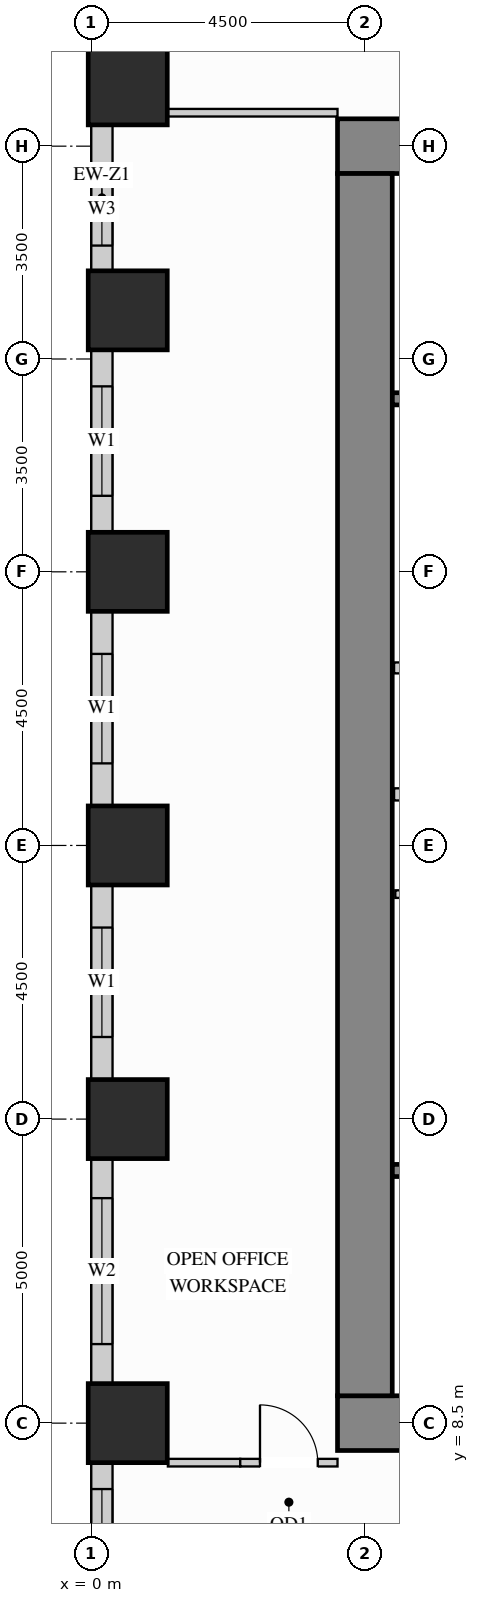
"""IFC4 building model, lengths in metres.
Left out: names, types, materials, properties, quantities, classifications, styles, units other than length and angle.
Written with IfcOpenShell. Run it as: python <this file> out.ifc"""

import sys

from ifc_helpers import new_model, si_unit, direction, frame, frame_2d, origin, origin_2d, place, context, subcontext, project, spatial, rectangle, extrude, source, transform, mapped, element, fill, save


model = new_model("IFC4")
c1 = context("Model", 3, precision=1e-05, world=origin(), true_north=direction((0.0, 1.0)))
c2 = subcontext(c1, "Body", "Model", "MODEL_VIEW")
j1 = project(units=[si_unit("LENGTHUNIT", "METRE"), si_unit("PLANEANGLEUNIT", "RADIAN")], contexts=[c1])
p1 = place(None, origin())
s1 = spatial("IfcSite", under=j1, at=p1, CompositionType="ELEMENT")
p2 = place(p1, origin())
s2 = spatial("IfcBuilding", under=s1, at=p2, CompositionType="ELEMENT")
p3 = place(p2, frame((0.0, 0.0, 44.1)))
s3 = spatial("IfcBuildingStorey", under=s2, at=p3, CompositionType="ELEMENT", Elevation=44.1)
m1 = source(origin(), c2, "Body", "SweptSolid", [
    extrude(rectangle(XDim=1.3, YDim=1.3, at=origin_2d()), origin(), (0.0, 0.0, 1.0), 3.38),
])
for number, where, z_axis, x_axis in (
    (1, (0.6, 13.5, 0.0), (0.0, 0.0, 1.0), (1.0, 0.0, 0.0)),
    (2, (0.6, 18.0, 0.0), (0.0, 0.0, 1.0), (1.0, 0.0, 0.0)),
    (3, (0.6, 22.5, 0.0), (0.0, 0.0, 1.0), (1.0, 0.0, 0.0)),
    (4, (0.6, 26.8, 0.0), (0.0, 0.0, 1.0), (1.0, 0.0, 0.0)),
    (5, (0.6, 30.5, 0.0), (0.0, 0.0, 1.0), (1.0, 0.0, 0.0)),
    (6, (0.6, 8.5, 0.0), (0.0, 0.0, 1.0), (1.0, 0.0, 0.0)),
):
    element("IfcColumn", number, at=place(p3, frame(where, z_axis=z_axis, x_axis=x_axis)), inside=s3, PredefinedType="COLUMN", context=c2, shape_type="MappedRepresentation", body=[
        mapped(m1, transform((0.0, 0.0, 0.0), x_axis=(1.0, 0.0, 0.0), y_axis=(0.0, 1.0, 0.0), z_axis=(0.0, 0.0, 1.0))),
    ])
m2 = source(origin(), c2, "Body", "SweptSolid", [
    extrude(rectangle(XDim=10.9, YDim=0.9, at=frame_2d((5.45, 0.0))), origin(), (0.0, 0.0, 1.0), 3.38),
])
for number, where, z_axis, x_axis in (
    (7, (4.05, 29.5, 0.0), (0.0, 0.0, 1.0), (1.0, 0.0, 0.0)),
    (8, (4.05, 8.5, 0.0), (0.0, 0.0, 1.0), (1.0, 0.0, 0.0)),
):
    element("IfcWall", number, at=place(p3, frame(where, z_axis=z_axis, x_axis=x_axis)), inside=s3, PredefinedType="SHEAR", context=c2, shape_type="MappedRepresentation", body=[
        mapped(m2, transform((0.0, 0.0, 0.0), x_axis=(1.0, 0.0, 0.0), y_axis=(0.0, 1.0, 0.0), z_axis=(0.0, 0.0, 1.0))),
    ])
m3 = source(origin(), c2, "Body", "SweptSolid", [
    extrude(rectangle(XDim=20.1, YDim=0.9, at=frame_2d((10.05, 0.0))), origin(), (0.0, 0.0, 1.0), 3.38),
])
p4 = place(p3, frame((4.5, 8.95, 0.0), z_axis=(0.0, 0.0, 1.0), x_axis=(0.0, 1.0, 0.0)))
e9 = element("IfcWall", 9, at=p4, inside=s3, PredefinedType="SHEAR", context=c2, shape_type="MappedRepresentation", body=[
    mapped(m3, transform((0.0, 0.0, 0.0), x_axis=(1.0, 0.0, 0.0), y_axis=(0.0, 1.0, 0.0), z_axis=(0.0, 0.0, 1.0))),
])
p5 = place(p3, frame((0.175, 29.852, 0.0), z_axis=(0.0, 0.0, 1.0), x_axis=(0.0, -1.0, 0.0)))
e10 = element("IfcWall", 10, at=p5, inside=s3, PredefinedType="SOLIDWALL", context=c2, shape_type="SweptSolid", body=[
    extrude(rectangle(XDim=2.404, YDim=0.35, at=frame_2d((1.202, 0.0))), origin(), (0.0, 0.0, 1.0), 2.51),
])
p6 = place(p5, frame((0.787, 0.0, 0.78)))
e11 = element("IfcOpeningElement", 11, at=p6, cuts=e10, PredefinedType="OPENING", context=c2, shape_type="SweptSolid", body=[
    extrude(rectangle(XDim=1.2, YDim=1.55, at=frame_2d((0.6, 0.775))), frame((0.0, 0.185, 0.0), z_axis=(0.0, -1.0, 0.0), x_axis=(1.0, 0.0, 0.0)), (0.0, 0.0, 1.0), 0.37),
])
p7 = place(p3, frame((0.175, 26.152, 0.0), z_axis=(0.0, 0.0, 1.0), x_axis=(0.0, -1.0, 0.0)))
e12 = element("IfcWall", 12, at=p7, inside=s3, PredefinedType="SOLIDWALL", context=c2, shape_type="SweptSolid", body=[
    extrude(rectangle(XDim=3.004, YDim=0.35, at=frame_2d((1.502, 0.0))), origin(), (0.0, 0.0, 1.0), 2.51),
])
p8 = place(p7, frame((0.602, 0.0, 0.78)))
e13 = element("IfcOpeningElement", 13, at=p8, cuts=e12, PredefinedType="OPENING", context=c2, shape_type="SweptSolid", body=[
    extrude(rectangle(XDim=1.8, YDim=1.55, at=frame_2d((0.9, 0.775))), frame((0.0, 0.185, 0.0), z_axis=(0.0, -1.0, 0.0), x_axis=(1.0, 0.0, 0.0)), (0.0, 0.0, 1.0), 0.37),
])
p9 = place(p3, frame((0.175, 21.852, 0.0), z_axis=(0.0, 0.0, 1.0), x_axis=(0.0, -1.0, 0.0)))
e14 = element("IfcWall", 14, at=p9, inside=s3, PredefinedType="SOLIDWALL", context=c2, shape_type="SweptSolid", body=[
    extrude(rectangle(XDim=3.204, YDim=0.35, at=frame_2d((1.602, 0.0))), origin(), (0.0, 0.0, 1.0), 2.51),
])
p10 = place(p9, frame((0.702, 0.0, 0.78)))
e15 = element("IfcOpeningElement", 15, at=p10, cuts=e14, PredefinedType="OPENING", context=c2, shape_type="SweptSolid", body=[
    extrude(rectangle(XDim=1.8, YDim=1.55, at=frame_2d((0.9, 0.775))), frame((0.0, 0.185, 0.0), z_axis=(0.0, -1.0, 0.0), x_axis=(1.0, 0.0, 0.0)), (0.0, 0.0, 1.0), 0.37),
])
p11 = place(p3, frame((0.175, 17.352, 0.0), z_axis=(0.0, 0.0, 1.0), x_axis=(0.0, -1.0, 0.0)))
e16 = element("IfcWall", 16, at=p11, inside=s3, PredefinedType="SOLIDWALL", context=c2, shape_type="SweptSolid", body=[
    extrude(rectangle(XDim=3.204, YDim=0.35, at=frame_2d((1.602, 0.0))), origin(), (0.0, 0.0, 1.0), 2.51),
])
p12 = place(p11, frame((0.702, 0.0, 0.78)))
e17 = element("IfcOpeningElement", 17, at=p12, cuts=e16, PredefinedType="OPENING", context=c2, shape_type="SweptSolid", body=[
    extrude(rectangle(XDim=1.8, YDim=1.55, at=frame_2d((0.9, 0.775))), frame((0.0, 0.185, 0.0), z_axis=(0.0, -1.0, 0.0), x_axis=(1.0, 0.0, 0.0)), (0.0, 0.0, 1.0), 0.37),
])
p13 = place(p3, frame((0.175, 12.852, 0.0), z_axis=(0.0, 0.0, 1.0), x_axis=(0.0, -1.0, 0.0)))
e18 = element("IfcWall", 18, at=p13, inside=s3, PredefinedType="SOLIDWALL", context=c2, shape_type="SweptSolid", body=[
    extrude(rectangle(XDim=3.704, YDim=0.35, at=frame_2d((1.852, 0.0))), origin(), (0.0, 0.0, 1.0), 2.51),
])
p14 = place(p13, frame((0.652, 0.0, 0.78)))
e19 = element("IfcOpeningElement", 19, at=p14, cuts=e18, PredefinedType="OPENING", context=c2, shape_type="SweptSolid", body=[
    extrude(rectangle(XDim=2.4, YDim=1.55, at=frame_2d((1.2, 0.775))), frame((0.0, 0.185, 0.0), z_axis=(0.0, -1.0, 0.0), x_axis=(1.0, 0.0, 0.0)), (0.0, 0.0, 1.0), 0.37),
])
p15 = place(p3, frame((0.175, 7.852, 0.0), z_axis=(0.0, 0.0, 1.0), x_axis=(0.0, -1.0, 0.0)))
e20 = element("IfcWall", 20, at=p15, inside=s3, PredefinedType="SOLIDWALL", context=c2, shape_type="SweptSolid", body=[
    extrude(rectangle(XDim=3.704, YDim=0.35, at=frame_2d((1.852, 0.0))), origin(), (0.0, 0.0, 1.0), 2.51),
])
p16 = place(p15, frame((0.436, 0.0, 0.78)))
e21 = element("IfcOpeningElement", 21, at=p16, cuts=e20, PredefinedType="OPENING", context=c2, shape_type="SweptSolid", body=[
    extrude(rectangle(XDim=2.4, YDim=1.55, at=frame_2d((1.2, 0.775))), frame((0.0, 0.185, 0.0), z_axis=(0.0, -1.0, 0.0), x_axis=(1.0, 0.0, 0.0)), (0.0, 0.0, 1.0), 0.37),
])
m4 = source(origin(), c2, "Body", "SweptSolid", [
    extrude(rectangle(XDim=2.17, YDim=0.18, at=frame_2d((1.085, 0.0))), origin(), (0.0, 0.0, 1.0), 3.365),
])
p17 = place(p3, frame((4.98, 20.92, 0.0), z_axis=(0.0, 0.0, 1.0), x_axis=(1.0, 0.0, 0.0)))
e22 = element("IfcWall", 22, at=p17, inside=s3, PredefinedType="PARTITIONING", context=c2, shape_type="MappedRepresentation", body=[
    mapped(m4, transform((0.0, 0.0, 0.0), x_axis=(1.0, 0.0, 0.0), y_axis=(0.0, 1.0, 0.0), z_axis=(0.0, 0.0, 1.0))),
])
p18 = place(p3, frame((5.0, 17.2, 0.0), z_axis=(0.0, 0.0, 1.0), x_axis=(1.0, 0.0, 0.0)))
e23 = element("IfcWall", 23, at=p18, inside=s3, PredefinedType="PARTITIONING", context=c2, shape_type="SweptSolid", body=[
    extrude(rectangle(XDim=2.4, YDim=0.125, at=frame_2d((1.2, 0.0))), origin(), (0.0, 0.0, 1.0), 3.365),
])
p19 = place(p18, frame((0.7, 0.0, 0.0)))
e24 = element("IfcOpeningElement", 24, at=p19, cuts=e23, PredefinedType="OPENING", context=c2, shape_type="SweptSolid", body=[
    extrude(rectangle(XDim=0.85, YDim=2.1, at=frame_2d((0.425, 1.05))), frame((0.0, 0.073, 0.0), z_axis=(0.0, -1.0, 0.0), x_axis=(1.0, 0.0, 0.0)), (0.0, 0.0, 1.0), 0.145),
])
m5 = source(origin(), c2, "Body", "SweptSolid", [
    extrude(rectangle(XDim=2.79, YDim=0.125, at=frame_2d((1.395, 0.0))), origin(), (0.0, 0.0, 1.0), 3.365),
])
p20 = place(p3, frame((1.26, 30.05, 0.0), z_axis=(0.0, 0.0, 1.0), x_axis=(1.0, 0.0, 0.0)))
e25 = element("IfcWall", 25, at=p20, inside=s3, PredefinedType="PARTITIONING", context=c2, shape_type="MappedRepresentation", body=[
    mapped(m5, transform((0.0, 0.0, 0.0), x_axis=(1.0, 0.0, 0.0), y_axis=(0.0, 1.0, 0.0), z_axis=(0.0, 0.0, 1.0))),
])
m6 = source(origin(), c2, "Body", "SweptSolid", [
    extrude(rectangle(XDim=1.19, YDim=0.125, at=frame_2d((0.595, 0.0))), origin(), (0.0, 0.0, 1.0), 3.365),
])
p21 = place(p3, frame((1.26, 7.85, 0.0), z_axis=(0.0, 0.0, 1.0), x_axis=(1.0, 0.0, 0.0)))
e26 = element("IfcWall", 26, at=p21, inside=s3, PredefinedType="PARTITIONING", context=c2, shape_type="MappedRepresentation", body=[
    mapped(m6, transform((0.0, 0.0, 0.0), x_axis=(1.0, 0.0, 0.0), y_axis=(0.0, 1.0, 0.0), z_axis=(0.0, 0.0, 1.0))),
])
p22 = place(p3, frame((2.45, 7.85, 0.0), z_axis=(0.0, 0.0, 1.0), x_axis=(1.0, 0.0, 0.0)))
e27 = element("IfcWall", 27, at=p22, inside=s3, PredefinedType="PARTITIONING", context=c2, shape_type="SweptSolid", body=[
    extrude(rectangle(XDim=1.6, YDim=0.125, at=frame_2d((0.8, 0.0))), origin(), (0.0, 0.0, 1.0), 3.365),
])
p23 = place(p22, frame((0.325, 0.0, 0.0)))
e28 = element("IfcOpeningElement", 28, at=p23, cuts=e27, PredefinedType="OPENING", context=c2, shape_type="SweptSolid", body=[
    extrude(rectangle(XDim=0.95, YDim=2.15, at=frame_2d((0.475, 1.075))), frame((0.0, 0.073, 0.0), z_axis=(0.0, -1.0, 0.0), x_axis=(1.0, 0.0, 0.0)), (0.0, 0.0, 1.0), 0.145),
])
m7 = source(origin(), c2, "Body", "SweptSolid", [
    extrude(rectangle(XDim=2.09, YDim=0.2, at=frame_2d((1.045, 0.0))), origin(), (0.0, 0.0, 1.0), 3.365),
])
p24 = place(p3, frame((4.98, 18.84, 0.0), z_axis=(0.0, 0.0, 1.0), x_axis=(1.0, 0.0, 0.0)))
e29 = element("IfcWall", 29, at=p24, inside=s3, PredefinedType="PARTITIONING", context=c2, shape_type="MappedRepresentation", body=[
    mapped(m7, transform((0.0, 0.0, 0.0), x_axis=(1.0, 0.0, 0.0), y_axis=(0.0, 1.0, 0.0), z_axis=(0.0, 0.0, 1.0))),
])
p25 = place(p3, frame((4.952, 12.655, 0.0), z_axis=(0.0, 0.0, 1.0), x_axis=(1.0, 0.0, 0.0)))
e30 = element("IfcWall", 30, at=p25, inside=s3, PredefinedType="SHEAR", context=c2, shape_type="SweptSolid", body=[
    extrude(rectangle(XDim=7.453, YDim=0.2, at=frame_2d((3.727, 0.0))), origin(), (0.0, 0.0, 1.0), 3.38),
])
p26 = place(p25, frame((0.4, 0.0, 0.0)))
e31 = element("IfcOpeningElement", 31, at=p26, cuts=e30, PredefinedType="OPENING", context=c2, shape_type="SweptSolid", body=[
    extrude(rectangle(XDim=1.1, YDim=2.15, at=frame_2d((0.55, 1.075))), frame((0.0, 0.11, 0.0), z_axis=(0.0, -1.0, 0.0), x_axis=(1.0, 0.0, 0.0)), (0.0, 0.0, 1.0), 0.22),
])
p27 = place(p3, frame((4.952, 25.345, 0.0), z_axis=(0.0, 0.0, 1.0), x_axis=(1.0, 0.0, 0.0)))
e32 = element("IfcWall", 32, at=p27, inside=s3, PredefinedType="SHEAR", context=c2, shape_type="SweptSolid", body=[
    extrude(rectangle(XDim=7.453, YDim=0.2, at=frame_2d((3.727, 0.0))), origin(), (0.0, 0.0, 1.0), 3.38),
])
p28 = place(p27, frame((0.4, 0.0, 0.0)))
e33 = element("IfcOpeningElement", 33, at=p28, cuts=e32, PredefinedType="OPENING", context=c2, shape_type="SweptSolid", body=[
    extrude(rectangle(XDim=1.1, YDim=2.15, at=frame_2d((0.55, 1.075))), frame((0.0, 0.11, 0.0), z_axis=(0.0, -1.0, 0.0), x_axis=(1.0, 0.0, 0.0)), (0.0, 0.0, 1.0), 0.22),
])
m8 = source(origin(), c2, "Body", "SweptSolid", [
    extrude(rectangle(XDim=0.95, YDim=2.15, at=frame_2d((0.475, 1.075))), frame((0.0, 0.025, 0.0), z_axis=(0.0, -1.0, 0.0), x_axis=(1.0, 0.0, 0.0)), (0.0, 0.0, 1.0), 0.05),
])
p29 = place(p23, origin())
e34 = element("IfcDoor", 34, at=p29, inside=s3, OperationType="SINGLE_SWING_LEFT", PredefinedType="DOOR", context=c2, shape_type="MappedRepresentation", body=[
    mapped(m8, transform((0.0, 0.0, 0.0), x_axis=(1.0, 0.0, 0.0), y_axis=(0.0, 1.0, 0.0), z_axis=(0.0, 0.0, 1.0))),
])
fill(e28, e34)
m9 = source(origin(), c2, "Body", "SweptSolid", [
    extrude(rectangle(XDim=1.8, YDim=1.55, at=frame_2d((0.9, 0.775))), frame((0.0, 0.03, 0.0), z_axis=(0.0, -1.0, 0.0), x_axis=(1.0, 0.0, 0.0)), (0.0, 0.0, 1.0), 0.06),
])
p30 = place(p8, origin())
e35 = element("IfcWindow", 35, at=p30, inside=s3, PartitioningType="SINGLE_PANEL", PredefinedType="WINDOW", context=c2, shape_type="MappedRepresentation", body=[
    mapped(m9, transform((0.0, 0.0, 0.0), x_axis=(1.0, 0.0, 0.0), y_axis=(0.0, 1.0, 0.0), z_axis=(0.0, 0.0, 1.0))),
])
fill(e13, e35)
p31 = place(p10, origin())
e36 = element("IfcWindow", 36, at=p31, inside=s3, PartitioningType="SINGLE_PANEL", PredefinedType="WINDOW", context=c2, shape_type="MappedRepresentation", body=[
    mapped(m9, transform((0.0, 0.0, 0.0), x_axis=(1.0, 0.0, 0.0), y_axis=(0.0, 1.0, 0.0), z_axis=(0.0, 0.0, 1.0))),
])
fill(e15, e36)
p32 = place(p12, origin())
e37 = element("IfcWindow", 37, at=p32, inside=s3, PartitioningType="SINGLE_PANEL", PredefinedType="WINDOW", context=c2, shape_type="MappedRepresentation", body=[
    mapped(m9, transform((0.0, 0.0, 0.0), x_axis=(1.0, 0.0, 0.0), y_axis=(0.0, 1.0, 0.0), z_axis=(0.0, 0.0, 1.0))),
])
fill(e17, e37)
m10 = source(origin(), c2, "Body", "SweptSolid", [
    extrude(rectangle(XDim=2.4, YDim=1.55, at=frame_2d((1.2, 0.775))), frame((0.0, 0.03, 0.0), z_axis=(0.0, -1.0, 0.0), x_axis=(1.0, 0.0, 0.0)), (0.0, 0.0, 1.0), 0.06),
])
p33 = place(p14, origin())
e38 = element("IfcWindow", 38, at=p33, inside=s3, PartitioningType="SINGLE_PANEL", PredefinedType="WINDOW", context=c2, shape_type="MappedRepresentation", body=[
    mapped(m10, transform((0.0, 0.0, 0.0), x_axis=(1.0, 0.0, 0.0), y_axis=(0.0, 1.0, 0.0), z_axis=(0.0, 0.0, 1.0))),
])
fill(e19, e38)
p34 = place(p16, origin())
e39 = element("IfcWindow", 39, at=p34, inside=s3, PartitioningType="SINGLE_PANEL", PredefinedType="WINDOW", context=c2, shape_type="MappedRepresentation", body=[
    mapped(m10, transform((0.0, 0.0, 0.0), x_axis=(1.0, 0.0, 0.0), y_axis=(0.0, 1.0, 0.0), z_axis=(0.0, 0.0, 1.0))),
])
fill(e21, e39)
m11 = source(origin(), c2, "Body", "SweptSolid", [
    extrude(rectangle(XDim=1.2, YDim=1.55, at=frame_2d((0.6, 0.775))), frame((0.0, 0.03, 0.0), z_axis=(0.0, -1.0, 0.0), x_axis=(1.0, 0.0, 0.0)), (0.0, 0.0, 1.0), 0.06),
])
p35 = place(p6, origin())
e40 = element("IfcWindow", 40, at=p35, inside=s3, PartitioningType="SINGLE_PANEL", PredefinedType="WINDOW", context=c2, shape_type="MappedRepresentation", body=[
    mapped(m11, transform((0.0, 0.0, 0.0), x_axis=(1.0, 0.0, 0.0), y_axis=(0.0, 1.0, 0.0), z_axis=(0.0, 0.0, 1.0))),
])
fill(e11, e40)
save(model, sys.argv[1])
